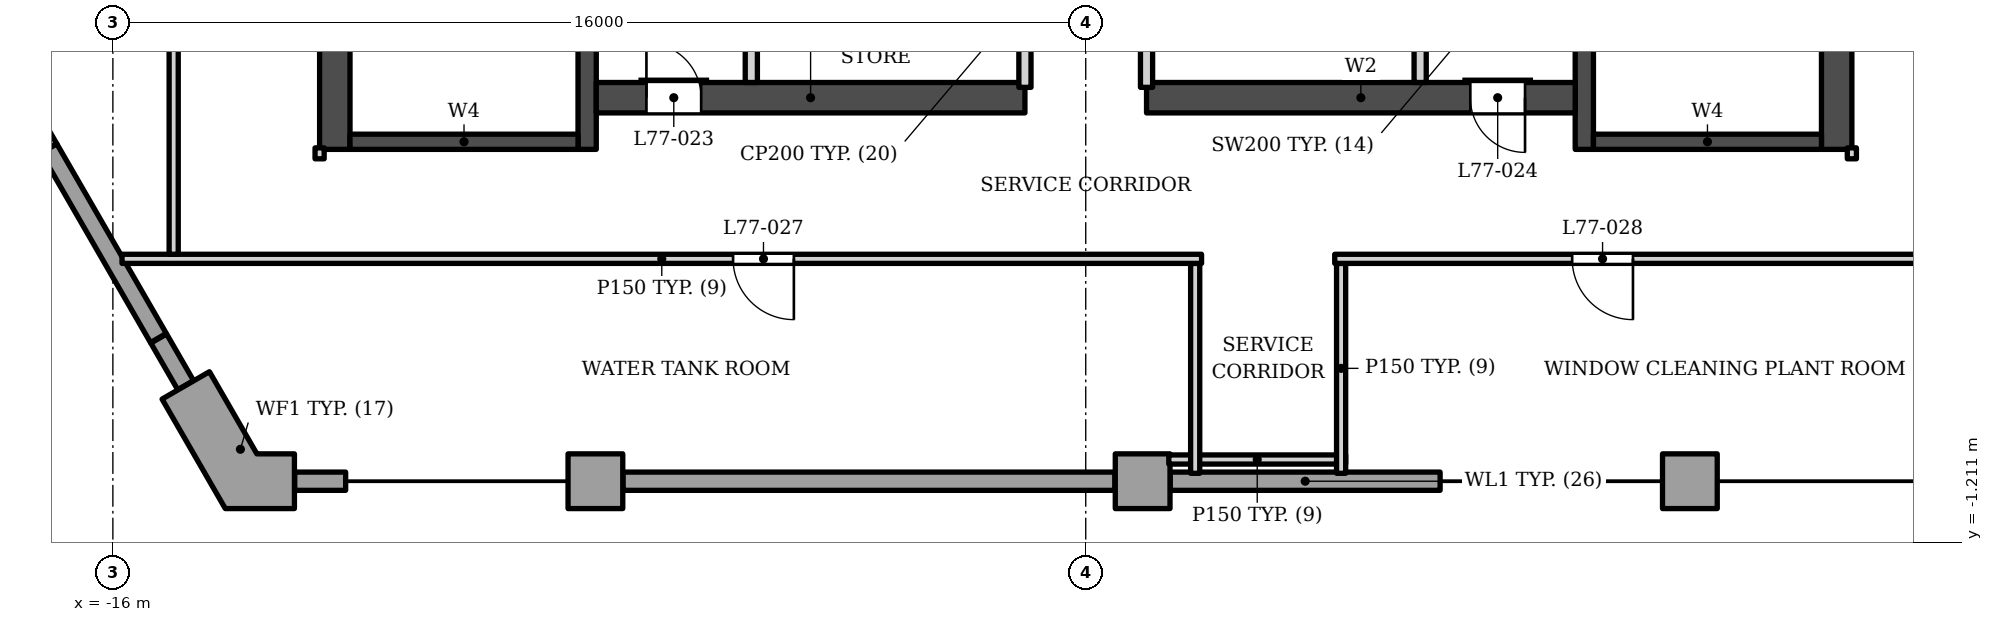
"""IFC4 building model, lengths in metres.
Left out: names, types, materials, properties, quantities, classifications, styles, units other than length and angle.
Written with IfcOpenShell. Run it as: python <this file> out.ifc"""

import sys

from ifc_helpers import new_model, si_unit, direction, frame, frame_2d, origin, place, context, subcontext, project, spatial, polyline, rectangle, outline, extrude, element, fill, save


model = new_model("IFC4")
c1 = context("Model", 3, precision=1e-05, world=origin(), true_north=direction((0.0, 1.0)))
c2 = subcontext(c1, "Body", "Model", "MODEL_VIEW")
j1 = project(units=[si_unit("LENGTHUNIT", "METRE"), si_unit("PLANEANGLEUNIT", "RADIAN")], contexts=[c1])
p1 = place(None, origin())
s1 = spatial("IfcSite", under=j1, at=p1, CompositionType="ELEMENT")
p2 = place(p1, origin())
s2 = spatial("IfcBuilding", under=s1, at=p2, CompositionType="ELEMENT")
p3 = place(p2, frame((0.0, 0.0, 330.5)))
s3 = spatial("IfcBuildingStorey", under=s2, at=p3, CompositionType="ELEMENT", Elevation=330.5)
p4 = place(p3, frame((-12.35, 5.253, 0.0), z_axis=(0.0, 0.0, 1.0), x_axis=(0.0, 1.0, 0.0)))
e1 = element("IfcWall", 1, at=p4, inside=s3, PredefinedType="SHEAR", context=c2, shape_type="SweptSolid", body=[
    extrude(rectangle(XDim=13.8, YDim=0.5, at=frame_2d((6.9, 0.0))), origin(), (0.0, 0.0, 1.0), 5.0),
])
p5 = place(p4, frame((7.2, 0.0, 0.0)))
e2 = element("IfcOpeningElement", 2, at=p5, cuts=e1, PredefinedType="OPENING", context=c2, shape_type="SweptSolid", body=[
    extrude(rectangle(XDim=1.2, YDim=2.1, at=frame_2d((0.6, 1.05))), frame((0.0, 0.26, 0.0), z_axis=(0.0, -1.0, 0.0), x_axis=(1.0, 0.0, 0.0)), (0.0, 0.0, 1.0), 0.52),
])
p6 = place(p4, frame((5.15, 0.0, 0.0)))
e3 = element("IfcOpeningElement", 3, at=p6, cuts=e1, PredefinedType="OPENING", context=c2, shape_type="SweptSolid", body=[
    extrude(rectangle(XDim=1.2, YDim=2.1, at=frame_2d((0.6, 1.05))), frame((0.0, 0.26, 0.0), z_axis=(0.0, -1.0, 0.0), x_axis=(1.0, 0.0, 0.0)), (0.0, 0.0, 1.0), 0.52),
])
p7 = place(p3, frame((-8.2, 5.253, 0.0), z_axis=(0.0, 0.0, 1.0), x_axis=(0.0, 1.0, 0.0)))
e4 = element("IfcWall", 4, at=p7, inside=s3, PredefinedType="SHEAR", context=c2, shape_type="SweptSolid", body=[
    extrude(rectangle(XDim=13.3, YDim=0.3, at=frame_2d((6.65, 0.0))), origin(), (0.0, 0.0, 1.0), 5.0),
])
p8 = place(p7, frame((7.1, 0.0, 0.0)))
e5 = element("IfcOpeningElement", 5, at=p8, cuts=e4, PredefinedType="OPENING", context=c2, shape_type="SweptSolid", body=[
    extrude(rectangle(XDim=1.4, YDim=2.1, at=frame_2d((0.7, 1.05))), frame((0.0, 0.16, 0.0), z_axis=(0.0, -1.0, 0.0), x_axis=(1.0, 0.0, 0.0)), (0.0, 0.0, 1.0), 0.32),
])
p9 = place(p7, frame((5.05, 0.0, 0.0)))
e6 = element("IfcOpeningElement", 6, at=p9, cuts=e4, PredefinedType="OPENING", context=c2, shape_type="SweptSolid", body=[
    extrude(rectangle(XDim=1.4, YDim=2.1, at=frame_2d((0.7, 1.05))), frame((0.0, 0.16, 0.0), z_axis=(0.0, -1.0, 0.0), x_axis=(1.0, 0.0, 0.0)), (0.0, 0.0, 1.0), 0.32),
])
p10 = place(p3, frame((-12.1, 5.378, 0.0), z_axis=(0.0, 0.0, 1.0), x_axis=(1.0, 0.0, 0.0)))
e7 = element("IfcWall", 7, at=p10, inside=s3, PredefinedType="SHEAR", context=c2, shape_type="SweptSolid", body=[
    extrude(rectangle(XDim=3.75, YDim=0.25, at=frame_2d((1.875, 0.0))), origin(), (0.0, 0.0, 1.0), 5.0),
])
p11 = place(p3, frame((12.35, 5.253, 0.0), z_axis=(0.0, 0.0, 1.0), x_axis=(0.0, 1.0, 0.0)))
e8 = element("IfcWall", 8, at=p11, inside=s3, PredefinedType="SHEAR", context=c2, shape_type="SweptSolid", body=[
    extrude(rectangle(XDim=13.8, YDim=0.5, at=frame_2d((6.9, 0.0))), origin(), (0.0, 0.0, 1.0), 5.0),
])
p12 = place(p11, frame((7.2, 0.0, 0.0)))
e9 = element("IfcOpeningElement", 9, at=p12, cuts=e8, PredefinedType="OPENING", context=c2, shape_type="SweptSolid", body=[
    extrude(rectangle(XDim=1.2, YDim=2.1, at=frame_2d((0.6, 1.05))), frame((0.0, 0.26, 0.0), z_axis=(0.0, -1.0, 0.0), x_axis=(1.0, 0.0, 0.0)), (0.0, 0.0, 1.0), 0.52),
])
p13 = place(p11, frame((5.15, 0.0, 0.0)))
e10 = element("IfcOpeningElement", 10, at=p13, cuts=e8, PredefinedType="OPENING", context=c2, shape_type="SweptSolid", body=[
    extrude(rectangle(XDim=1.2, YDim=2.1, at=frame_2d((0.6, 1.05))), frame((0.0, 0.26, 0.0), z_axis=(0.0, -1.0, 0.0), x_axis=(1.0, 0.0, 0.0)), (0.0, 0.0, 1.0), 0.52),
])
p14 = place(p3, frame((8.2, 5.253, 0.0), z_axis=(0.0, 0.0, 1.0), x_axis=(0.0, 1.0, 0.0)))
e11 = element("IfcWall", 11, at=p14, inside=s3, PredefinedType="SHEAR", context=c2, shape_type="SweptSolid", body=[
    extrude(rectangle(XDim=13.3, YDim=0.3, at=frame_2d((6.65, 0.0))), origin(), (0.0, 0.0, 1.0), 5.0),
])
p15 = place(p14, frame((7.1, 0.0, 0.0)))
e12 = element("IfcOpeningElement", 12, at=p15, cuts=e11, PredefinedType="OPENING", context=c2, shape_type="SweptSolid", body=[
    extrude(rectangle(XDim=1.4, YDim=2.1, at=frame_2d((0.7, 1.05))), frame((0.0, 0.16, 0.0), z_axis=(0.0, -1.0, 0.0), x_axis=(1.0, 0.0, 0.0)), (0.0, 0.0, 1.0), 0.32),
])
p16 = place(p14, frame((5.05, 0.0, 0.0)))
e13 = element("IfcOpeningElement", 13, at=p16, cuts=e11, PredefinedType="OPENING", context=c2, shape_type="SweptSolid", body=[
    extrude(rectangle(XDim=1.4, YDim=2.1, at=frame_2d((0.7, 1.05))), frame((0.0, 0.16, 0.0), z_axis=(0.0, -1.0, 0.0), x_axis=(1.0, 0.0, 0.0)), (0.0, 0.0, 1.0), 0.32),
])
p17 = place(p3, frame((8.35, 5.378, 0.0), z_axis=(0.0, 0.0, 1.0), x_axis=(1.0, 0.0, 0.0)))
e14 = element("IfcWall", 14, at=p17, inside=s3, PredefinedType="SHEAR", context=c2, shape_type="SweptSolid", body=[
    extrude(rectangle(XDim=3.75, YDim=0.25, at=frame_2d((1.875, 0.0))), origin(), (0.0, 0.0, 1.0), 5.0),
])
p18 = place(p3, frame((-8.05, 6.103, 0.0), z_axis=(0.0, 0.0, 1.0), x_axis=(1.0, 0.0, 0.0)))
e15 = element("IfcWall", 15, at=p18, inside=s3, PredefinedType="SHEAR", context=c2, shape_type="SweptSolid", body=[
    extrude(rectangle(XDim=7.05, YDim=0.5, at=frame_2d((3.525, 0.0))), origin(), (0.0, 0.0, 1.0), 5.0),
])
p19 = place(p18, frame((0.825, 0.0, 0.0)))
e16 = element("IfcOpeningElement", 16, at=p19, cuts=e15, PredefinedType="OPENING", context=c2, shape_type="SweptSolid", body=[
    extrude(rectangle(XDim=0.9, YDim=2.1, at=frame_2d((0.45, 1.05))), frame((0.0, 0.26, 0.0), z_axis=(0.0, -1.0, 0.0), x_axis=(1.0, 0.0, 0.0)), (0.0, 0.0, 1.0), 0.52),
])
p20 = place(p3, frame((1.0, 6.103, 0.0), z_axis=(0.0, 0.0, 1.0), x_axis=(1.0, 0.0, 0.0)))
e17 = element("IfcWall", 17, at=p20, inside=s3, PredefinedType="SHEAR", context=c2, shape_type="SweptSolid", body=[
    extrude(rectangle(XDim=7.05, YDim=0.5, at=frame_2d((3.525, 0.0))), origin(), (0.0, 0.0, 1.0), 5.0),
])
p21 = place(p20, frame((5.325, 0.0, 0.0)))
e18 = element("IfcOpeningElement", 18, at=p21, cuts=e17, PredefinedType="OPENING", context=c2, shape_type="SweptSolid", body=[
    extrude(rectangle(XDim=0.9, YDim=2.1, at=frame_2d((0.45, 1.05))), frame((0.0, 0.26, 0.0), z_axis=(0.0, -1.0, 0.0), x_axis=(1.0, 0.0, 0.0)), (0.0, 0.0, 1.0), 0.52),
])
p22 = place(p3, frame((-17.052, 5.269, 0.0), z_axis=(0.0, 0.0, 1.0), x_axis=(0.500012057535, -0.866018442252, 0.0)))
e19 = element("IfcWall", 19, at=p22, inside=s3, PredefinedType="ELEMENTEDWALL", context=c2, shape_type="SweptSolid", body=[
    extrude(rectangle(XDim=3.6, YDim=0.3, at=frame_2d((1.8, 0.0))), origin(), (0.0, 0.0, 1.0), 3.8),
])
p23 = place(p3, origin())
e20 = element("IfcWall", 20, at=p23, inside=s3, PredefinedType="SOLIDWALL", context=c2, shape_type="SweptSolid", body=[
    extrude(outline(polyline([(-7.614, 0.246), (-8.514, 0.246), (-8.514, -0.655), (-7.614, -0.655), (-7.614, 0.246)])), origin(), (0.0, 0.0, 1.0), 3.297),
])
p24 = place(p3, origin())
e21 = element("IfcWall", 21, at=p24, inside=s3, PredefinedType="SOLIDWALL", context=c2, shape_type="SweptSolid", body=[
    extrude(outline(polyline([(1.386, 0.246), (0.486, 0.246), (0.486, -0.655), (1.386, -0.655), (1.386, 0.246)])), origin(), (0.0, 0.0, 1.0), 3.297),
])
p25 = place(p3, origin())
e22 = element("IfcWall", 22, at=p25, inside=s3, PredefinedType="SOLIDWALL", context=c2, shape_type="SweptSolid", body=[
    extrude(outline(polyline([(10.386, 0.246), (9.486, 0.246), (9.486, -0.655), (10.386, -0.655), (10.386, 0.246)])), origin(), (0.0, 0.0, 1.0), 3.297),
])
p26 = place(p3, origin())
e23 = element("IfcWall", 23, at=p26, inside=s3, PredefinedType="SOLIDWALL", context=c2, shape_type="SweptSolid", body=[
    extrude(outline(polyline([(-14.412, 1.596), (-15.191, 1.146), (-14.151, -0.655), (-13.014, -0.655), (-13.014, 0.246), (-13.632, 0.246), (-14.412, 1.596)])), origin(), (0.0, 0.0, 1.0), 3.297),
])
p27 = place(p3, frame((-17.471, 5.996, 0.0), z_axis=(0.0, 0.0, 1.0), x_axis=(0.499941663064, -0.866059082011, 0.0)))
e24 = element("IfcWall", 24, at=p27, inside=s3, PredefinedType="ELEMENTEDWALL", context=c2, shape_type="SweptSolid", body=[
    extrude(rectangle(XDim=0.835, YDim=0.3, at=frame_2d((0.418, 0.0))), origin(), (0.0, 0.0, 1.0), 3.8),
])
p28 = place(p3, frame((-14.803, 1.375, 0.0), z_axis=(0.0, 0.0, 1.0), x_axis=(-0.49999285859, 0.86602952684, 0.0)))
e25 = element("IfcWall", 25, at=p28, inside=s3, PredefinedType="ELEMENTEDWALL", context=c2, shape_type="SweptSolid", body=[
    extrude(rectangle(XDim=0.886, YDim=0.3, at=frame_2d((0.443, 0.0))), origin(), (0.0, 0.0, 1.0), 3.8),
])
p29 = place(p3, frame((-13.01, -0.204, 0.0), z_axis=(0.0, 0.0, 1.0), x_axis=(1.0, 0.0, 0.0)))
e26 = element("IfcWall", 26, at=p29, inside=s3, PredefinedType="ELEMENTEDWALL", context=c2, shape_type="SweptSolid", body=[
    extrude(rectangle(XDim=0.838, YDim=0.3, at=frame_2d((0.419, 0.0))), origin(), (0.0, 0.0, 1.0), 3.279),
])
p30 = place(p3, frame((-7.61, -0.204, 0.0), z_axis=(0.0, 0.0, 1.0), x_axis=(1.0, 0.0, 0.0)))
e27 = element("IfcWall", 27, at=p30, inside=s3, PredefinedType="ELEMENTEDWALL", context=c2, shape_type="SweptSolid", body=[
    extrude(rectangle(XDim=8.089, YDim=0.3, at=frame_2d((4.044, 0.0))), origin(), (0.0, 0.0, 1.0), 3.279),
])
p31 = place(p3, frame((1.39, -0.204, 0.0), z_axis=(0.0, 0.0, 1.0), x_axis=(1.0, 0.0, 0.0)))
e28 = element("IfcWall", 28, at=p31, inside=s3, PredefinedType="ELEMENTEDWALL", context=c2, shape_type="SweptSolid", body=[
    extrude(rectangle(XDim=4.438, YDim=0.3, at=frame_2d((2.219, 0.0))), origin(), (0.0, 0.0, 1.0), 3.279),
])
for number, where, z_axis, x_axis in (
    (29, (-1.0, 6.273, 0.0), (0.0, 0.0, 1.0), (0.0, 1.0, 0.0)),
    (30, (1.0, 6.273, 0.0), (0.0, 0.0, 1.0), (0.0, 1.0, 0.0)),
):
    element("IfcWall", number, at=place(p3, frame(where, z_axis=z_axis, x_axis=x_axis)), inside=s3, PredefinedType="PARTITIONING", context=c2, shape_type="SweptSolid", body=[
        extrude(rectangle(XDim=2.88, YDim=0.2, at=frame_2d((1.44, 0.0))), origin(), (0.0, 0.0, 1.0), 4.8),
    ])
p32 = place(p3, frame((-5.5, 6.353, 0.0), z_axis=(0.0, 0.0, 1.0), x_axis=(0.0, 1.0, 0.0)))
e31 = element("IfcWall", 31, at=p32, inside=s3, PredefinedType="SOLIDWALL", context=c2, shape_type="SweptSolid", body=[
    extrude(rectangle(XDim=7.85, YDim=0.2, at=frame_2d((3.925, 0.0))), origin(), (0.0, 0.0, 1.0), 4.8),
])
p33 = place(p32, frame((3.6, 0.0, 0.0)))
e32 = element("IfcOpeningElement", 32, at=p33, cuts=e31, PredefinedType="OPENING", context=c2, shape_type="SweptSolid", body=[
    extrude(rectangle(XDim=1.4, YDim=2.1, at=frame_2d((0.7, 1.05))), frame((0.0, 0.11, 0.0), z_axis=(0.0, -1.0, 0.0), x_axis=(1.0, 0.0, 0.0)), (0.0, 0.0, 1.0), 0.22),
])
p34 = place(p3, frame((5.5, 6.353, 0.0), z_axis=(0.0, 0.0, 1.0), x_axis=(0.0, 1.0, 0.0)))
e33 = element("IfcWall", 33, at=p34, inside=s3, PredefinedType="SOLIDWALL", context=c2, shape_type="SweptSolid", body=[
    extrude(rectangle(XDim=7.85, YDim=0.2, at=frame_2d((3.925, 0.0))), origin(), (0.0, 0.0, 1.0), 4.8),
])
p35 = place(p34, frame((3.6, 0.0, 0.0)))
e34 = element("IfcOpeningElement", 34, at=p35, cuts=e33, PredefinedType="OPENING", context=c2, shape_type="SweptSolid", body=[
    extrude(rectangle(XDim=1.4, YDim=2.1, at=frame_2d((0.7, 1.05))), frame((0.0, 0.11, 0.0), z_axis=(0.0, -1.0, 0.0), x_axis=(1.0, 0.0, 0.0)), (0.0, 0.0, 1.0), 0.22),
])
p36 = place(p3, frame((1.366, 0.153, 0.0), z_axis=(0.0, 0.0, 1.0), x_axis=(1.0, 0.0, 0.0)))
e35 = element("IfcWall", 35, at=p36, inside=s3, PredefinedType="PARTITIONING", context=c2, shape_type="SweptSolid", body=[
    extrude(rectangle(XDim=2.909, YDim=0.15, at=frame_2d((1.455, 0.0))), origin(), (0.0, 0.0, 1.0), 3.912),
])
for number, where, z_axis, x_axis in (
    (36, (1.8, -0.074, 0.0), (0.0, 0.0, 1.0), (0.0, 1.0, 0.0)),
    (37, (4.2, -0.074, 0.0), (0.0, 0.0, 1.0), (0.0, 1.0, 0.0)),
):
    element("IfcWall", number, at=place(p3, frame(where, z_axis=z_axis, x_axis=x_axis)), inside=s3, PredefinedType="PARTITIONING", context=c2, shape_type="SweptSolid", body=[
        extrude(outline(polyline([(0.0, 0.0), (3.452, 0.0), (3.452, 4.8), (1.211, 4.8), (0.0, 3.784), (0.0, 0.0)])), frame((0.0, 0.075, 0.0), z_axis=(0.0, -1.0, 0.0), x_axis=(1.0, 0.0, 0.0)), (0.0, 0.0, 1.0), 0.15),
    ])
p37 = place(p3, frame((-15.85, 3.453, 0.0), z_axis=(0.0, 0.0, 1.0), x_axis=(1.0, 0.0, 0.0)))
e38 = element("IfcWall", 38, at=p37, inside=s3, PredefinedType="PARTITIONING", context=c2, shape_type="SweptSolid", body=[
    extrude(rectangle(XDim=17.755, YDim=0.15, at=frame_2d((8.877, 0.0))), origin(), (0.0, 0.0, 1.0), 4.8),
])
p38 = place(p37, frame((10.05, 0.0, 0.0)))
e39 = element("IfcOpeningElement", 39, at=p38, cuts=e38, PredefinedType="OPENING", context=c2, shape_type="SweptSolid", body=[
    extrude(rectangle(XDim=1.0, YDim=2.1, at=frame_2d((0.5, 1.05))), frame((0.0, 0.085, 0.0), z_axis=(0.0, -1.0, 0.0), x_axis=(1.0, 0.0, 0.0)), (0.0, 0.0, 1.0), 0.17),
])
p39 = place(p3, frame((4.095, 3.453, 0.0), z_axis=(0.0, 0.0, 1.0), x_axis=(1.0, 0.0, 0.0)))
e40 = element("IfcWall", 40, at=p39, inside=s3, PredefinedType="PARTITIONING", context=c2, shape_type="SweptSolid", body=[
    extrude(rectangle(XDim=13.627, YDim=0.15, at=frame_2d((6.813, 0.0))), origin(), (0.0, 0.0, 1.0), 4.8),
])
p40 = place(p39, frame((3.905, 0.0, 0.0)))
e41 = element("IfcOpeningElement", 41, at=p40, cuts=e40, PredefinedType="OPENING", context=c2, shape_type="SweptSolid", body=[
    extrude(rectangle(XDim=1.0, YDim=2.1, at=frame_2d((0.5, 1.05))), frame((0.0, 0.085, 0.0), z_axis=(0.0, -1.0, 0.0), x_axis=(1.0, 0.0, 0.0)), (0.0, 0.0, 1.0), 0.17),
])
p41 = place(p3, frame((-15.0, 3.528, 0.0), z_axis=(0.0, 0.0, 1.0), x_axis=(0.0, 1.0, 0.0)))
e42 = element("IfcWall", 42, at=p41, inside=s3, PredefinedType="PARTITIONING", context=c2, shape_type="SweptSolid", body=[
    extrude(rectangle(XDim=15.395, YDim=0.15, at=frame_2d((7.698, 0.0))), origin(), (0.0, 0.0, 1.0), 4.02),
])
p42 = place(p41, frame((7.275, 0.0, 0.0)))
e43 = element("IfcOpeningElement", 43, at=p42, cuts=e42, PredefinedType="OPENING", context=c2, shape_type="SweptSolid", body=[
    extrude(rectangle(XDim=1.0, YDim=2.1, at=frame_2d((0.5, 1.05))), frame((0.0, 0.085, 0.0), z_axis=(0.0, -1.0, 0.0), x_axis=(1.0, 0.0, 0.0)), (0.0, 0.0, 1.0), 0.17),
])
for number, where, z_axis, x_axis in (
    (44, (-12.6, 5.098, 0.0), (0.0, 0.0, 1.0), (0.0, 1.0, 0.0)),
    (45, (12.6, 5.098, 0.0), (0.0, 0.0, 1.0), (0.0, 1.0, 0.0)),
):
    element("IfcWall", number, at=place(p3, frame(where, z_axis=z_axis, x_axis=x_axis)), inside=s3, PredefinedType="PARTITIONING", context=c2, shape_type="SweptSolid", body=[
        extrude(rectangle(XDim=0.18, YDim=0.15, at=frame_2d((0.09, 0.0))), origin(), (0.0, 0.0, 1.0), 4.8),
    ])
p43 = place(p19, origin())
e46 = element("IfcDoor", 46, at=p43, inside=s3, OperationType="SINGLE_SWING_LEFT", PredefinedType="DOOR", context=c2, shape_type="SweptSolid", body=[
    extrude(rectangle(XDim=0.9, YDim=2.1, at=frame_2d((0.45, 1.05))), frame((0.0, 0.025, 0.0), z_axis=(0.0, -1.0, 0.0), x_axis=(1.0, 0.0, 0.0)), (0.0, 0.0, 1.0), 0.05),
])
fill(e16, e46)
p44 = place(p21, origin())
e47 = element("IfcDoor", 47, at=p44, inside=s3, OperationType="SINGLE_SWING_RIGHT", PredefinedType="DOOR", context=c2, shape_type="SweptSolid", body=[
    extrude(rectangle(XDim=0.9, YDim=2.1, at=frame_2d((0.45, 1.05))), frame((0.0, 0.025, 0.0), z_axis=(0.0, -1.0, 0.0), x_axis=(1.0, 0.0, 0.0)), (0.0, 0.0, 1.0), 0.05),
])
fill(e18, e47)
p45 = place(p38, origin())
e48 = element("IfcDoor", 48, at=p45, inside=s3, OperationType="SINGLE_SWING_RIGHT", PredefinedType="DOOR", context=c2, shape_type="SweptSolid", body=[
    extrude(rectangle(XDim=1.0, YDim=2.1, at=frame_2d((0.5, 1.05))), frame((0.0, 0.025, 0.0), z_axis=(0.0, -1.0, 0.0), x_axis=(1.0, 0.0, 0.0)), (0.0, 0.0, 1.0), 0.05),
])
fill(e39, e48)
p46 = place(p40, origin())
e49 = element("IfcDoor", 49, at=p46, inside=s3, OperationType="SINGLE_SWING_RIGHT", PredefinedType="DOOR", context=c2, shape_type="SweptSolid", body=[
    extrude(rectangle(XDim=1.0, YDim=2.1, at=frame_2d((0.5, 1.05))), frame((0.0, 0.025, 0.0), z_axis=(0.0, -1.0, 0.0), x_axis=(1.0, 0.0, 0.0)), (0.0, 0.0, 1.0), 0.05),
])
fill(e41, e49)
save(model, sys.argv[1])
